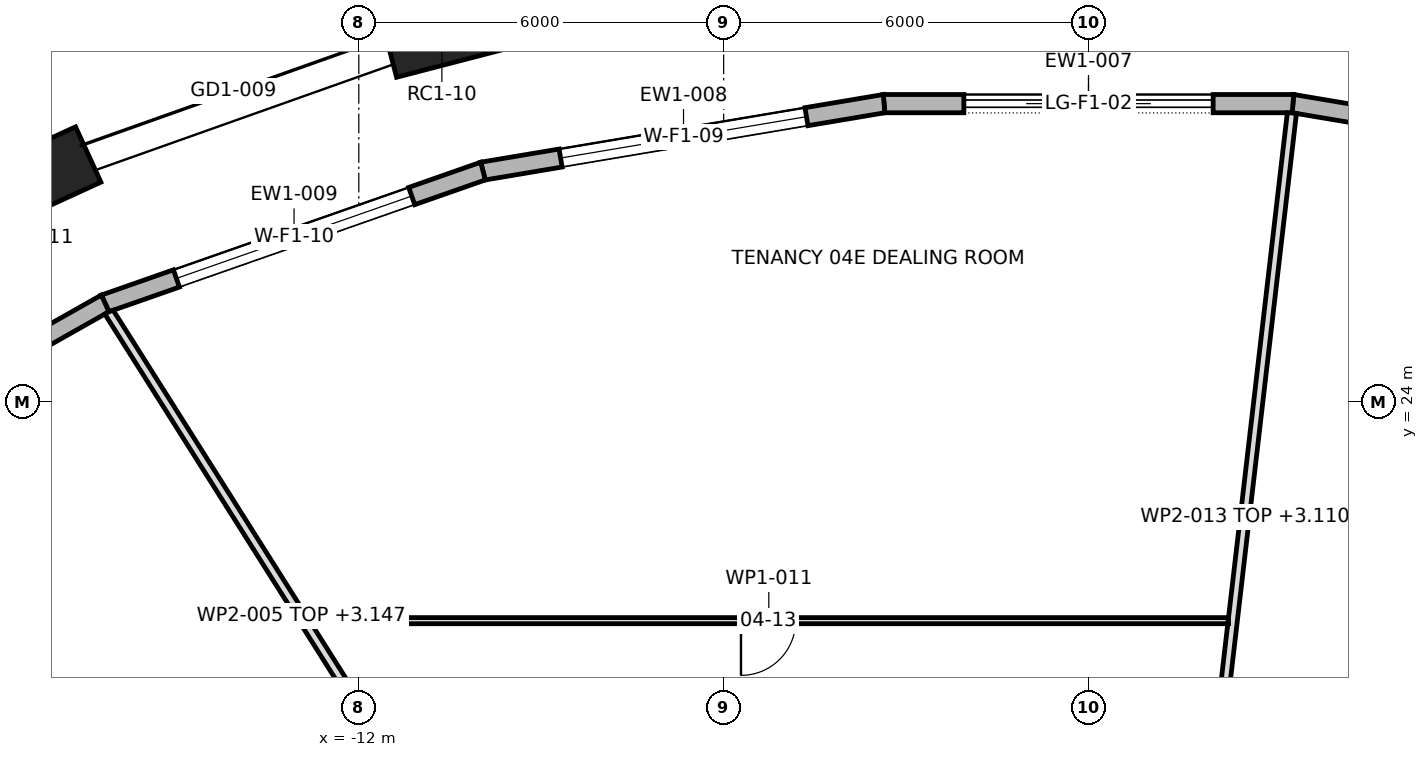
"""IFC4 building model, lengths in metres.
Left out: names, types, materials, properties, quantities, classifications, styles, units other than length and angle.
Written with IfcOpenShell. Run it as: python <this file> out.ifc"""

import sys

from ifc_helpers import new_model, si_unit, direction, frame, frame_2d, origin, origin_2d, place, context, subcontext, project, spatial, polyline, rectangle, outline, extrude, element, fill, save


model = new_model("IFC4")
c1 = context("Model", 3, precision=1e-05, world=origin(), true_north=direction((0.0, 1.0)))
c2 = subcontext(c1, "Body", "Model", "MODEL_VIEW")
j1 = project(units=[si_unit("LENGTHUNIT", "METRE"), si_unit("PLANEANGLEUNIT", "RADIAN")], contexts=[c1])
p1 = place(None, origin())
s1 = spatial("IfcSite", under=j1, at=p1, CompositionType="ELEMENT")
p2 = place(p1, origin())
s2 = spatial("IfcBuilding", under=s1, at=p2, CompositionType="ELEMENT")
p3 = place(p2, frame((0.0, 0.0, 69.7)))
s3 = spatial("IfcBuildingStorey", under=s2, at=p3, CompositionType="ELEMENT", Elevation=69.7)
for number, where, z_axis, x_axis in (
    (1, (-10.634, 30.046, 0.0), (0.0, 0.0, 1.0), (-0.968, -0.252, 0.0)),
    (2, (-17.268, 27.691, 0.0), (0.0, 0.0, 1.0), (-0.909, -0.417, 0.0)),
):
    element("IfcColumn", number, at=place(p3, frame(where, z_axis=z_axis, x_axis=x_axis)), inside=s3, PredefinedType="COLUMN", context=c2, shape_type="SweptSolid", body=[
        extrude(rectangle(XDim=1.8, YDim=1.0, at=origin_2d()), origin(), (0.0, 0.0, 1.0), 4.2),
    ])
p4 = place(p3, frame((9.958, 27.793, 0.0), z_axis=(0.0, 0.0, 1.0), x_axis=(-0.986153133093, 0.165837263877, 0.0)))
e3 = element("IfcWall", 3, at=p4, inside=s3, PredefinedType="STANDARD", context=c2, shape_type="SweptSolid", body=[
    extrude(outline(polyline([(-0.013, -0.15), (6.7, -0.15), (6.676, 0.15), (0.013, 0.15), (-0.013, -0.15)])), origin(), (0.0, 0.0, 1.0), 3.9),
])
p5 = place(p4, frame((1.294, 0.0, 0.6)))
e4 = element("IfcOpeningElement", 4, at=p5, cuts=e3, PredefinedType="OPENING", context=c2, shape_type="SweptSolid", body=[
    extrude(rectangle(XDim=4.1, YDim=2.85, at=frame_2d((2.05, 1.425))), frame((0.0, 0.162, 0.0), z_axis=(0.0, -1.0, 0.0), x_axis=(1.0, 0.0, 0.0)), (0.0, 0.0, 1.0), 0.324),
])
p6 = place(p3, frame((3.362, 28.903, 0.0), z_axis=(0.0, 0.0, 1.0), x_axis=(-1.0, 0.0, 0.0)))
e5 = element("IfcWall", 5, at=p6, inside=s3, PredefinedType="STANDARD", context=c2, shape_type="SweptSolid", body=[
    extrude(outline(polyline([(-0.012, -0.15), (6.737, -0.15), (6.712, 0.15), (0.012, 0.15), (-0.012, -0.15)])), origin(), (0.0, 0.0, 1.0), 3.9),
])
p7 = place(p6, frame((1.312, 0.0, 0.0)))
e6 = element("IfcOpeningElement", 6, at=p7, cuts=e5, PredefinedType="OPENING", context=c2, shape_type="SweptSolid", body=[
    extrude(rectangle(XDim=4.1, YDim=3.45, at=frame_2d((2.05, 1.725))), frame((0.0, 0.162, 0.0), z_axis=(0.0, -1.0, 0.0), x_axis=(1.0, 0.0, 0.0)), (0.0, 0.0, 1.0), 0.324),
])
p8 = place(p3, frame((-3.362, 28.903, 0.0), z_axis=(0.0, 0.0, 1.0), x_axis=(-0.986153133093, -0.165837263877, 0.0)))
e7 = element("IfcWall", 7, at=p8, inside=s3, PredefinedType="STANDARD", context=c2, shape_type="SweptSolid", body=[
    extrude(outline(polyline([(-0.012, -0.15), (6.701, -0.15), (6.675, 0.15), (0.012, 0.15), (-0.012, -0.15)])), origin(), (0.0, 0.0, 1.0), 3.9),
])
p9 = place(p8, frame((1.294, 0.0, 0.6)))
e8 = element("IfcOpeningElement", 8, at=p9, cuts=e7, PredefinedType="OPENING", context=c2, shape_type="SweptSolid", body=[
    extrude(rectangle(XDim=4.1, YDim=2.85, at=frame_2d((2.05, 1.425))), frame((0.0, 0.162, 0.0), z_axis=(0.0, -1.0, 0.0), x_axis=(1.0, 0.0, 0.0)), (0.0, 0.0, 1.0), 0.324),
])
p10 = place(p3, frame((-9.958, 27.793, 0.0), z_axis=(0.0, 0.0, 1.0), x_axis=(-0.94380689486, -0.330497420889, 0.0)))
e9 = element("IfcWall", 9, at=p10, inside=s3, PredefinedType="STANDARD", context=c2, shape_type="SweptSolid", body=[
    extrude(outline(polyline([(-0.013, -0.15), (6.597, -0.15), (6.571, 0.15), (0.013, 0.15), (-0.013, -0.15)])), origin(), (0.0, 0.0, 1.0), 3.9),
])
p11 = place(p10, frame((1.242, 0.0, 0.6)))
e10 = element("IfcOpeningElement", 10, at=p11, cuts=e9, PredefinedType="OPENING", context=c2, shape_type="SweptSolid", body=[
    extrude(rectangle(XDim=4.1, YDim=2.85, at=frame_2d((2.05, 1.425))), frame((0.0, 0.162, 0.0), z_axis=(0.0, -1.0, 0.0), x_axis=(1.0, 0.0, 0.0)), (0.0, 0.0, 1.0), 0.324),
])
p12 = place(p3, frame((-16.172, 25.617, 0.0), z_axis=(0.0, 0.0, 1.0), x_axis=(-0.870673928577, -0.491860661262, 0.0)))
e11 = element("IfcWall", 11, at=p12, inside=s3, PredefinedType="STANDARD", context=c2, shape_type="SweptSolid", body=[
    extrude(outline(polyline([(-0.013, -0.15), (6.439, -0.15), (6.411, 0.15), (0.013, 0.15), (-0.013, -0.15)])), origin(), (0.0, 0.0, 1.0), 3.9),
])
p13 = place(p12, frame((1.163, 0.0, 0.6)))
e12 = element("IfcOpeningElement", 12, at=p13, cuts=e11, PredefinedType="OPENING", context=c2, shape_type="SweptSolid", body=[
    extrude(rectangle(XDim=4.1, YDim=2.85, at=frame_2d((2.05, 1.425))), frame((0.0, 0.162, 0.0), z_axis=(0.0, -1.0, 0.0), x_axis=(1.0, 0.0, 0.0)), (0.0, 0.0, 1.0), 0.324),
])
p14 = place(p3, frame((-16.113, 25.482, 0.0), z_axis=(0.0, 0.0, 1.0), x_axis=(0.534334526362, -0.845273100209, 0.0)))
e13 = element("IfcWall", 13, at=p14, inside=s3, PredefinedType="PARTITIONING", context=c2, shape_type="SweptSolid", body=[
    extrude(outline(polyline([(0.0, -0.075), (1.965, -0.075), (3.93, -0.075), (5.896, -0.075), (7.861, -0.075), (9.826, -0.075), (11.791, -0.075), (11.886, 0.075), (11.886, 0.075), (9.964, 0.075), (8.041, 0.075), (6.119, 0.075), (6.118, 0.073), (6.115, 0.075), (4.591, 0.075), (3.068, 0.075), (1.544, 0.075), (0.02, 0.075), (0.003, 0.002), (0.0, -0.069), (0.0, -0.075)])), origin(), (0.0, 0.0, 1.0), 3.147),
])
p15 = place(p3, frame((-12.843, 20.4, 0.0), z_axis=(0.0, 0.0, 1.0), x_axis=(1.0, 0.0, 0.0)))
e14 = element("IfcWall", 14, at=p15, inside=s3, PredefinedType="PARTITIONING", context=c2, shape_type="SweptSolid", body=[
    extrude(outline(polyline([(0.063, -0.05), (1.947, -0.05), (3.831, -0.05), (5.714, -0.05), (7.598, -0.05), (9.482, -0.05), (11.366, -0.05), (13.25, -0.05), (15.134, -0.05), (15.146, 0.049), (15.146, 0.05), (13.252, 0.05), (11.359, 0.05), (9.466, 0.05), (7.573, 0.05), (5.68, 0.05), (3.786, 0.05), (1.893, 0.05), (0.0, 0.05), (0.0, 0.049), (0.063, -0.05)])), origin(), (0.0, 0.0, 1.0), 3.9),
])
p16 = place(p15, frame((7.128, 0.0, 0.0)))
e15 = element("IfcOpeningElement", 15, at=p16, cuts=e14, PredefinedType="OPENING", context=c2, shape_type="SweptSolid", body=[
    extrude(rectangle(XDim=0.9, YDim=2.1, at=frame_2d((0.45, 1.05))), frame((0.0, 0.062, 0.0), z_axis=(0.0, -1.0, 0.0), x_axis=(1.0, 0.0, 0.0)), (0.0, 0.0, 1.0), 0.124),
])
p17 = place(p3, frame((1.798, 15.467, 0.0), z_axis=(0.0, 0.0, 1.0), x_axis=(0.115693975805, 0.993284905736, 0.0)))
e16 = element("IfcWall", 16, at=p17, inside=s3, PredefinedType="PARTITIONING", context=c2, shape_type="SweptSolid", body=[
    extrude(outline(polyline([(13.373, -0.075), (13.373, 0.028), (13.367, 0.075), (11.695, 0.075), (10.022, 0.075), (8.35, 0.075), (6.678, 0.075), (5.005, 0.075), (4.909, 0.064), (4.908, 0.075), (3.272, 0.075), (1.636, 0.075), (0.0, 0.075), (0.0, 0.073), (0.017, -0.075), (1.925, -0.075), (3.833, -0.075), (5.741, -0.075), (7.649, -0.075), (9.557, -0.075), (11.465, -0.075), (13.373, -0.075)])), origin(), (0.0, 0.0, 1.0), 3.11),
])
p18 = place(p7, origin())
e17 = element("IfcDoor", 17, at=p18, inside=s3, OperationType="DOUBLE_DOOR_SLIDING", PredefinedType="DOOR", context=c2, shape_type="SweptSolid", body=[
    extrude(rectangle(XDim=4.1, YDim=3.45, at=frame_2d((2.05, 1.725))), frame((0.0, 0.025, 0.0), z_axis=(0.0, -1.0, 0.0), x_axis=(1.0, 0.0, 0.0)), (0.0, 0.0, 1.0), 0.05),
])
fill(e6, e17)
p19 = place(p9, origin())
e18 = element("IfcWindow", 18, at=p19, inside=s3, PartitioningType="TRIPLE_PANEL_VERTICAL", PredefinedType="WINDOW", context=c2, shape_type="SweptSolid", body=[
    extrude(rectangle(XDim=4.1, YDim=2.85, at=frame_2d((2.05, 1.425))), frame((0.0, 0.03, 0.0), z_axis=(0.0, -1.0, 0.0), x_axis=(1.0, 0.0, 0.0)), (0.0, 0.0, 1.0), 0.06),
])
fill(e8, e18)
p20 = place(p11, origin())
e19 = element("IfcWindow", 19, at=p20, inside=s3, PartitioningType="TRIPLE_PANEL_VERTICAL", PredefinedType="WINDOW", context=c2, shape_type="SweptSolid", body=[
    extrude(rectangle(XDim=4.1, YDim=2.85, at=frame_2d((2.05, 1.425))), frame((0.0, 0.03, 0.0), z_axis=(0.0, -1.0, 0.0), x_axis=(1.0, 0.0, 0.0)), (0.0, 0.0, 1.0), 0.06),
])
fill(e10, e19)
p21 = place(p16, frame((0.9, 0.0, 0.0), z_axis=(0.0, 0.0, 1.0), x_axis=(-1.0, 0.0, 0.0)))
e20 = element("IfcDoor", 20, at=p21, inside=s3, OperationType="SINGLE_SWING_LEFT", PredefinedType="DOOR", context=c2, shape_type="SweptSolid", body=[
    extrude(rectangle(XDim=0.9, YDim=2.1, at=frame_2d((0.45, 1.05))), frame((0.0, 0.025, 0.0), z_axis=(0.0, -1.0, 0.0), x_axis=(1.0, 0.0, 0.0)), (0.0, 0.0, 1.0), 0.05),
])
fill(e15, e20)
save(model, sys.argv[1])
